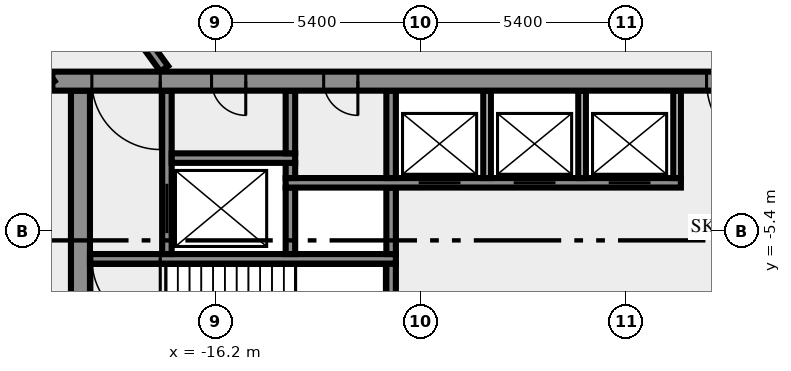
"""IFC4 building model, lengths in metres.
Left out: names, types, materials, properties, quantities, classifications, styles, units other than length and angle.
Written with IfcOpenShell. Run it as: python <this file> out.ifc"""

import sys

from ifc_helpers import new_model, si_unit, direction, frame, frame_2d, origin, place, context, subcontext, project, spatial, rectangle, extrude, element, fill, save


model = new_model("IFC4")
c1 = context("Model", 3, precision=1e-05, world=origin(), true_north=direction((0.0, 1.0)))
c2 = subcontext(c1, "Body", "Model", "MODEL_VIEW")
j1 = project(units=[si_unit("LENGTHUNIT", "METRE"), si_unit("PLANEANGLEUNIT", "RADIAN")], contexts=[c1])
p1 = place(None, origin())
s1 = spatial("IfcSite", under=j1, at=p1, CompositionType="ELEMENT")
p2 = place(p1, origin())
s2 = spatial("IfcBuilding", under=s1, at=p2, CompositionType="ELEMENT")
p3 = place(p2, frame((0.0, 0.0, 139.0)))
s3 = spatial("IfcBuildingStorey", under=s2, at=p3, CompositionType="ELEMENT", Elevation=139.0)
p4 = place(p3, frame((-19.75, -10.5, 0.0), z_axis=(0.0, 0.0, 1.0), x_axis=(0.0, 1.0, 0.0)))
e1 = element("IfcWall", 1, at=p4, inside=s3, PredefinedType="SHEAR", context=c2, shape_type="SweptSolid", body=[
    extrude(rectangle(XDim=8.8, YDim=0.5, at=frame_2d((4.4, 0.0))), origin(), (0.0, 0.0, 1.0), 4.65),
])
p5 = place(p3, frame((-11.575, -7.25, 0.0), z_axis=(0.0, 0.0, 1.0), x_axis=(0.0, 1.0, 0.0)))
e2 = element("IfcWall", 2, at=p5, inside=s3, PredefinedType="SHEAR", context=c2, shape_type="SweptSolid", body=[
    extrude(rectangle(XDim=1.0, YDim=0.25, at=frame_2d((0.5, 0.0))), origin(), (0.0, 0.0, 1.0), 4.65),
])
p6 = place(p3, frame((-11.45, -6.125, 0.0), z_axis=(0.0, 0.0, 1.0), x_axis=(-1.0, 0.0, 0.0)))
e3 = element("IfcWall", 3, at=p6, inside=s3, PredefinedType="SHEAR", context=c2, shape_type="SweptSolid", body=[
    extrude(rectangle(XDim=8.05, YDim=0.25, at=frame_2d((4.025, 0.0))), origin(), (0.0, 0.0, 1.0), 4.65),
])
p7 = place(p6, frame((6.2, 0.0, 0.0)))
e4 = element("IfcOpeningElement", 4, at=p7, cuts=e3, PredefinedType="OPENING", context=c2, shape_type="SweptSolid", body=[
    extrude(rectangle(XDim=1.8, YDim=2.1, at=frame_2d((0.9, 1.05))), frame((0.0, 0.135, 0.0), z_axis=(0.0, -1.0, 0.0), x_axis=(1.0, 0.0, 0.0)), (0.0, 0.0, 1.0), 0.27),
])
p8 = place(p3, frame((-17.475, -6.0, 0.0), z_axis=(0.0, 0.0, 1.0), x_axis=(0.0, 1.0, 0.0)))
e5 = element("IfcWall", 5, at=p8, inside=s3, PredefinedType="SHEAR", context=c2, shape_type="SweptSolid", body=[
    extrude(rectangle(XDim=4.3, YDim=0.25, at=frame_2d((2.15, 0.0))), origin(), (0.0, 0.0, 1.0), 4.65),
])
p9 = place(p8, frame((0.55, 0.0, 0.0)))
e6 = element("IfcOpeningElement", 6, at=p9, cuts=e5, PredefinedType="OPENING", context=c2, shape_type="SweptSolid", body=[
    extrude(rectangle(XDim=1.3, YDim=2.1, at=frame_2d((0.65, 1.05))), frame((0.0, 0.135, 0.0), z_axis=(0.0, -1.0, 0.0), x_axis=(1.0, 0.0, 0.0)), (0.0, 0.0, 1.0), 0.27),
])
for number, where, z_axis, x_axis in (
    (7, (-14.225, -6.0, 0.0), (0.0, 0.0, 1.0), (0.0, 1.0, 0.0)),
    (8, (-11.575, -6.0, 0.0), (0.0, 0.0, 1.0), (0.0, 1.0, 0.0)),
):
    element("IfcWall", number, at=place(p3, frame(where, z_axis=z_axis, x_axis=x_axis)), inside=s3, PredefinedType="SHEAR", context=c2, shape_type="SweptSolid", body=[
        extrude(rectangle(XDim=1.75, YDim=0.25, at=frame_2d((0.875, 0.0))), origin(), (0.0, 0.0, 1.0), 4.65),
    ])
p10 = place(p3, frame((-14.35, -4.125, 0.0), z_axis=(0.0, 0.0, 1.0), x_axis=(1.0, 0.0, 0.0)))
e9 = element("IfcWall", 9, at=p10, inside=s3, PredefinedType="SHEAR", context=c2, shape_type="SweptSolid", body=[
    extrude(rectangle(XDim=10.4, YDim=0.25, at=frame_2d((5.2, 0.0))), origin(), (0.0, 0.0, 1.0), 4.65),
])
p11 = place(p10, frame((3.5, 0.0, 0.0)))
e10 = element("IfcOpeningElement", 10, at=p11, cuts=e9, PredefinedType="OPENING", context=c2, shape_type="SweptSolid", body=[
    extrude(rectangle(XDim=1.1, YDim=2.1, at=frame_2d((0.55, 1.05))), frame((0.0, 0.135, 0.0), z_axis=(0.0, -1.0, 0.0), x_axis=(1.0, 0.0, 0.0)), (0.0, 0.0, 1.0), 0.27),
])
p12 = place(p10, frame((6.0, 0.0, 0.0)))
e11 = element("IfcOpeningElement", 11, at=p12, cuts=e9, PredefinedType="OPENING", context=c2, shape_type="SweptSolid", body=[
    extrude(rectangle(XDim=1.1, YDim=2.1, at=frame_2d((0.55, 1.05))), frame((0.0, 0.135, 0.0), z_axis=(0.0, -1.0, 0.0), x_axis=(1.0, 0.0, 0.0)), (0.0, 0.0, 1.0), 0.27),
])
p13 = place(p10, frame((8.5, 0.0, 0.0)))
e12 = element("IfcOpeningElement", 12, at=p13, cuts=e9, PredefinedType="OPENING", context=c2, shape_type="SweptSolid", body=[
    extrude(rectangle(XDim=1.1, YDim=2.1, at=frame_2d((0.55, 1.05))), frame((0.0, 0.135, 0.0), z_axis=(0.0, -1.0, 0.0), x_axis=(1.0, 0.0, 0.0)), (0.0, 0.0, 1.0), 0.27),
])
p14 = place(p3, frame((-14.225, -4.0, 0.0), z_axis=(0.0, 0.0, 1.0), x_axis=(0.0, 1.0, 0.0)))
e13 = element("IfcWall", 13, at=p14, inside=s3, PredefinedType="SHEAR", context=c2, shape_type="SweptSolid", body=[
    extrude(rectangle(XDim=0.4, YDim=0.25, at=frame_2d((0.2, 0.0))), origin(), (0.0, 0.0, 1.0), 4.65),
])
p15 = place(p3, frame((-11.575, -4.0, 0.0), z_axis=(0.0, 0.0, 1.0), x_axis=(0.0, 1.0, 0.0)))
e14 = element("IfcWall", 14, at=p15, inside=s3, PredefinedType="SHEAR", context=c2, shape_type="SweptSolid", body=[
    extrude(rectangle(XDim=2.3, YDim=0.25, at=frame_2d((1.15, 0.0))), origin(), (0.0, 0.0, 1.0), 4.65),
])
for number, where, z_axis, x_axis in (
    (15, (-9.05, -4.0, 0.0), (0.0, 0.0, 1.0), (0.0, 1.0, 0.0)),
    (16, (-6.55, -4.0, 0.0), (0.0, 0.0, 1.0), (0.0, 1.0, 0.0)),
    (17, (-4.05, -4.0, 0.0), (0.0, 0.0, 1.0), (0.0, 1.0, 0.0)),
):
    element("IfcWall", number, at=place(p3, frame(where, z_axis=z_axis, x_axis=x_axis)), inside=s3, PredefinedType="SOLIDWALL", context=c2, shape_type="SweptSolid", body=[
        extrude(rectangle(XDim=2.3, YDim=0.2, at=frame_2d((1.15, 0.0))), origin(), (0.0, 0.0, 1.0), 4.65),
    ])
p16 = place(p3, frame((-17.35, -3.475, 0.0), z_axis=(0.0, 0.0, 1.0), x_axis=(1.0, 0.0, 0.0)))
e18 = element("IfcWall", 18, at=p16, inside=s3, PredefinedType="SHEAR", context=c2, shape_type="SweptSolid", body=[
    extrude(rectangle(XDim=3.25, YDim=0.25, at=frame_2d((1.625, 0.0))), origin(), (0.0, 0.0, 1.0), 4.65),
])
p17 = place(p3, frame((-14.225, -3.35, 0.0), z_axis=(0.0, 0.0, 1.0), x_axis=(0.0, 1.0, 0.0)))
e19 = element("IfcWall", 19, at=p17, inside=s3, PredefinedType="SHEAR", context=c2, shape_type="SweptSolid", body=[
    extrude(rectangle(XDim=1.65, YDim=0.25, at=frame_2d((0.825, 0.0))), origin(), (0.0, 0.0, 1.0), 4.65),
])
p18 = place(p3, frame((20.49, -1.45, 0.0), z_axis=(0.0, 0.0, 1.0), x_axis=(-1.0, 0.0, 0.0)))
e20 = element("IfcWall", 20, at=p18, inside=s3, PredefinedType="SHEAR", context=c2, shape_type="SweptSolid", body=[
    extrude(rectangle(XDim=40.98, YDim=0.5, at=frame_2d((20.49, 0.0))), origin(), (0.0, 0.0, 1.0), 4.65),
])
p19 = place(p18, frame((38.14, 0.0, 0.0)))
e21 = element("IfcOpeningElement", 21, at=p19, cuts=e20, PredefinedType="OPENING", context=c2, shape_type="SweptSolid", body=[
    extrude(rectangle(XDim=1.8, YDim=2.1, at=frame_2d((0.9, 1.05))), frame((0.0, 0.26, 0.0), z_axis=(0.0, -1.0, 0.0), x_axis=(1.0, 0.0, 0.0)), (0.0, 0.0, 1.0), 0.52),
])
p20 = place(p18, frame((35.89, 0.0, 0.0)))
e22 = element("IfcOpeningElement", 22, at=p20, cuts=e20, PredefinedType="OPENING", context=c2, shape_type="SweptSolid", body=[
    extrude(rectangle(XDim=0.9, YDim=2.1, at=frame_2d((0.45, 1.05))), frame((0.0, 0.26, 0.0), z_axis=(0.0, -1.0, 0.0), x_axis=(1.0, 0.0, 0.0)), (0.0, 0.0, 1.0), 0.52),
])
p21 = place(p18, frame((32.94, 0.0, 0.0)))
e23 = element("IfcOpeningElement", 23, at=p21, cuts=e20, PredefinedType="OPENING", context=c2, shape_type="SweptSolid", body=[
    extrude(rectangle(XDim=0.9, YDim=2.1, at=frame_2d((0.45, 1.05))), frame((0.0, 0.26, 0.0), z_axis=(0.0, -1.0, 0.0), x_axis=(1.0, 0.0, 0.0)), (0.0, 0.0, 1.0), 0.52),
])
p22 = place(p18, frame((21.765, 0.0, 0.0)))
e24 = element("IfcOpeningElement", 24, at=p22, cuts=e20, PredefinedType="OPENING", context=c2, shape_type="SweptSolid", body=[
    extrude(rectangle(XDim=2.0, YDim=2.1, at=frame_2d((1.0, 1.05))), frame((0.0, 0.26, 0.0), z_axis=(0.0, -1.0, 0.0), x_axis=(1.0, 0.0, 0.0)), (0.0, 0.0, 1.0), 0.52),
])
p23 = place(p18, frame((7.14, 0.0, 0.0)))
e25 = element("IfcOpeningElement", 25, at=p23, cuts=e20, PredefinedType="OPENING", context=c2, shape_type="SweptSolid", body=[
    extrude(rectangle(XDim=0.9, YDim=2.1, at=frame_2d((0.45, 1.05))), frame((0.0, 0.26, 0.0), z_axis=(0.0, -1.0, 0.0), x_axis=(1.0, 0.0, 0.0)), (0.0, 0.0, 1.0), 0.52),
])
p24 = place(p18, frame((5.028, 0.0, 0.0)))
e26 = element("IfcOpeningElement", 26, at=p24, cuts=e20, PredefinedType="OPENING", context=c2, shape_type="SweptSolid", body=[
    extrude(rectangle(XDim=0.8, YDim=2.1, at=frame_2d((0.4, 1.05))), frame((0.0, 0.26, 0.0), z_axis=(0.0, -1.0, 0.0), x_axis=(1.0, 0.0, 0.0)), (0.0, 0.0, 1.0), 0.52),
])
p25 = place(p18, frame((3.452, 0.0, 0.0)))
e27 = element("IfcOpeningElement", 27, at=p25, cuts=e20, PredefinedType="OPENING", context=c2, shape_type="SweptSolid", body=[
    extrude(rectangle(XDim=0.8, YDim=2.1, at=frame_2d((0.4, 1.05))), frame((0.0, 0.26, 0.0), z_axis=(0.0, -1.0, 0.0), x_axis=(1.0, 0.0, 0.0)), (0.0, 0.0, 1.0), 0.52),
])
p26 = place(p18, frame((1.04, 0.0, 0.0)))
e28 = element("IfcOpeningElement", 28, at=p26, cuts=e20, PredefinedType="OPENING", context=c2, shape_type="SweptSolid", body=[
    extrude(rectangle(XDim=1.8, YDim=2.1, at=frame_2d((0.9, 1.05))), frame((0.0, 0.26, 0.0), z_axis=(0.0, -1.0, 0.0), x_axis=(1.0, 0.0, 0.0)), (0.0, 0.0, 1.0), 0.52),
])
p27 = place(p3, frame((-20.531, -1.523, 0.0), z_axis=(0.0, 0.0, 1.0), x_axis=(-0.587781654618, 0.809019608226, 0.0)))
e29 = element("IfcWall", 29, at=p27, inside=s3, PredefinedType="SOLIDWALL", context=c2, shape_type="SweptSolid", body=[
    extrude(rectangle(XDim=33.911, YDim=0.25, at=frame_2d((16.956, 0.0))), origin(), (0.0, 0.0, 1.0), 4.65),
])
p28 = place(p27, frame((9.166, 0.0, 0.0)))
e30 = element("IfcOpeningElement", 30, at=p28, cuts=e29, PredefinedType="OPENING", context=c2, shape_type="SweptSolid", body=[
    extrude(rectangle(XDim=1.2, YDim=2.1, at=frame_2d((0.6, 1.05))), frame((0.0, 0.135, 0.0), z_axis=(0.0, -1.0, 0.0), x_axis=(1.0, 0.0, 0.0)), (0.0, 0.0, 1.0), 0.27),
])
p29 = place(p27, frame((7.566, 0.0, 0.0)))
e31 = element("IfcOpeningElement", 31, at=p29, cuts=e29, PredefinedType="OPENING", context=c2, shape_type="SweptSolid", body=[
    extrude(rectangle(XDim=0.9, YDim=2.1, at=frame_2d((0.45, 1.05))), frame((0.0, 0.135, 0.0), z_axis=(0.0, -1.0, 0.0), x_axis=(1.0, 0.0, 0.0)), (0.0, 0.0, 1.0), 0.27),
])
p30 = place(p3, frame((-38.32, 27.469, 0.0), z_axis=(0.0, 0.0, 1.0), x_axis=(0.587788021768, -0.809014982226, 0.0)))
e32 = element("IfcWall", 32, at=p30, inside=s3, PredefinedType="SOLIDWALL", context=c2, shape_type="SweptSolid", body=[
    extrude(rectangle(XDim=35.344, YDim=0.25, at=frame_2d((17.672, 0.0))), origin(), (0.0, 0.0, 1.0), 4.65),
])
p31 = place(p30, frame((31.052, 0.0, 0.0)))
e33 = element("IfcOpeningElement", 33, at=p31, cuts=e32, PredefinedType="OPENING", context=c2, shape_type="SweptSolid", body=[
    extrude(rectangle(XDim=0.9, YDim=2.1, at=frame_2d((0.45, 1.05))), frame((0.0, 0.135, 0.0), z_axis=(0.0, -1.0, 0.0), x_axis=(1.0, 0.0, 0.0)), (0.0, 0.0, 1.0), 0.27),
])
p32 = place(p30, frame((0.392, 0.0, 0.0)))
e34 = element("IfcOpeningElement", 34, at=p32, cuts=e32, PredefinedType="OPENING", context=c2, shape_type="SweptSolid", body=[
    extrude(rectangle(XDim=0.9, YDim=2.1, at=frame_2d((0.45, 1.05))), frame((0.0, 0.135, 0.0), z_axis=(0.0, -1.0, 0.0), x_axis=(1.0, 0.0, 0.0)), (0.0, 0.0, 1.0), 0.27),
])
p33 = place(p7, origin())
e35 = element("IfcDoor", 35, at=p33, inside=s3, OperationType="DOUBLE_DOOR_SINGLE_SWING", PredefinedType="DOOR", context=c2, shape_type="SweptSolid", body=[
    extrude(rectangle(XDim=1.8, YDim=2.1, at=frame_2d((0.9, 1.05))), frame((0.0, 0.025, 0.0), z_axis=(0.0, -1.0, 0.0), x_axis=(1.0, 0.0, 0.0)), (0.0, 0.0, 1.0), 0.05),
])
fill(e4, e35)
p34 = place(p9, origin())
e36 = element("IfcDoor", 36, at=p34, inside=s3, OperationType="DOUBLE_DOOR_SLIDING", PredefinedType="DOOR", context=c2, shape_type="SweptSolid", body=[
    extrude(rectangle(XDim=1.3, YDim=2.1, at=frame_2d((0.65, 1.05))), frame((0.0, 0.025, 0.0), z_axis=(0.0, -1.0, 0.0), x_axis=(1.0, 0.0, 0.0)), (0.0, 0.0, 1.0), 0.05),
])
fill(e6, e36)
p35 = place(p11, origin())
e37 = element("IfcDoor", 37, at=p35, inside=s3, OperationType="DOUBLE_DOOR_SLIDING", PredefinedType="DOOR", context=c2, shape_type="SweptSolid", body=[
    extrude(rectangle(XDim=1.1, YDim=2.1, at=frame_2d((0.55, 1.05))), frame((0.0, 0.025, 0.0), z_axis=(0.0, -1.0, 0.0), x_axis=(1.0, 0.0, 0.0)), (0.0, 0.0, 1.0), 0.05),
])
fill(e10, e37)
p36 = place(p12, origin())
e38 = element("IfcDoor", 38, at=p36, inside=s3, OperationType="DOUBLE_DOOR_SLIDING", PredefinedType="DOOR", context=c2, shape_type="SweptSolid", body=[
    extrude(rectangle(XDim=1.1, YDim=2.1, at=frame_2d((0.55, 1.05))), frame((0.0, 0.025, 0.0), z_axis=(0.0, -1.0, 0.0), x_axis=(1.0, 0.0, 0.0)), (0.0, 0.0, 1.0), 0.05),
])
fill(e11, e38)
p37 = place(p13, origin())
e39 = element("IfcDoor", 39, at=p37, inside=s3, OperationType="DOUBLE_DOOR_SLIDING", PredefinedType="DOOR", context=c2, shape_type="SweptSolid", body=[
    extrude(rectangle(XDim=1.1, YDim=2.1, at=frame_2d((0.55, 1.05))), frame((0.0, 0.025, 0.0), z_axis=(0.0, -1.0, 0.0), x_axis=(1.0, 0.0, 0.0)), (0.0, 0.0, 1.0), 0.05),
])
fill(e12, e39)
p38 = place(p19, origin())
e40 = element("IfcDoor", 40, at=p38, inside=s3, OperationType="DOUBLE_DOOR_SINGLE_SWING", PredefinedType="DOOR", context=c2, shape_type="SweptSolid", body=[
    extrude(rectangle(XDim=1.8, YDim=2.1, at=frame_2d((0.9, 1.05))), frame((0.0, 0.025, 0.0), z_axis=(0.0, -1.0, 0.0), x_axis=(1.0, 0.0, 0.0)), (0.0, 0.0, 1.0), 0.05),
])
fill(e21, e40)
p39 = place(p20, origin())
e41 = element("IfcDoor", 41, at=p39, inside=s3, OperationType="SINGLE_SWING_RIGHT", PredefinedType="DOOR", context=c2, shape_type="SweptSolid", body=[
    extrude(rectangle(XDim=0.9, YDim=2.1, at=frame_2d((0.45, 1.05))), frame((0.0, 0.025, 0.0), z_axis=(0.0, -1.0, 0.0), x_axis=(1.0, 0.0, 0.0)), (0.0, 0.0, 1.0), 0.05),
])
fill(e22, e41)
p40 = place(p21, origin())
e42 = element("IfcDoor", 42, at=p40, inside=s3, OperationType="SINGLE_SWING_RIGHT", PredefinedType="DOOR", context=c2, shape_type="SweptSolid", body=[
    extrude(rectangle(XDim=0.9, YDim=2.1, at=frame_2d((0.45, 1.05))), frame((0.0, 0.025, 0.0), z_axis=(0.0, -1.0, 0.0), x_axis=(1.0, 0.0, 0.0)), (0.0, 0.0, 1.0), 0.05),
])
fill(e23, e42)
p41 = place(p22, origin())
e43 = element("IfcDoor", 43, at=p41, inside=s3, OperationType="DOUBLE_DOOR_SINGLE_SWING", PredefinedType="DOOR", context=c2, shape_type="SweptSolid", body=[
    extrude(rectangle(XDim=2.0, YDim=2.1, at=frame_2d((1.0, 1.05))), frame((0.0, 0.025, 0.0), z_axis=(0.0, -1.0, 0.0), x_axis=(1.0, 0.0, 0.0)), (0.0, 0.0, 1.0), 0.05),
])
fill(e24, e43)
save(model, sys.argv[1])
